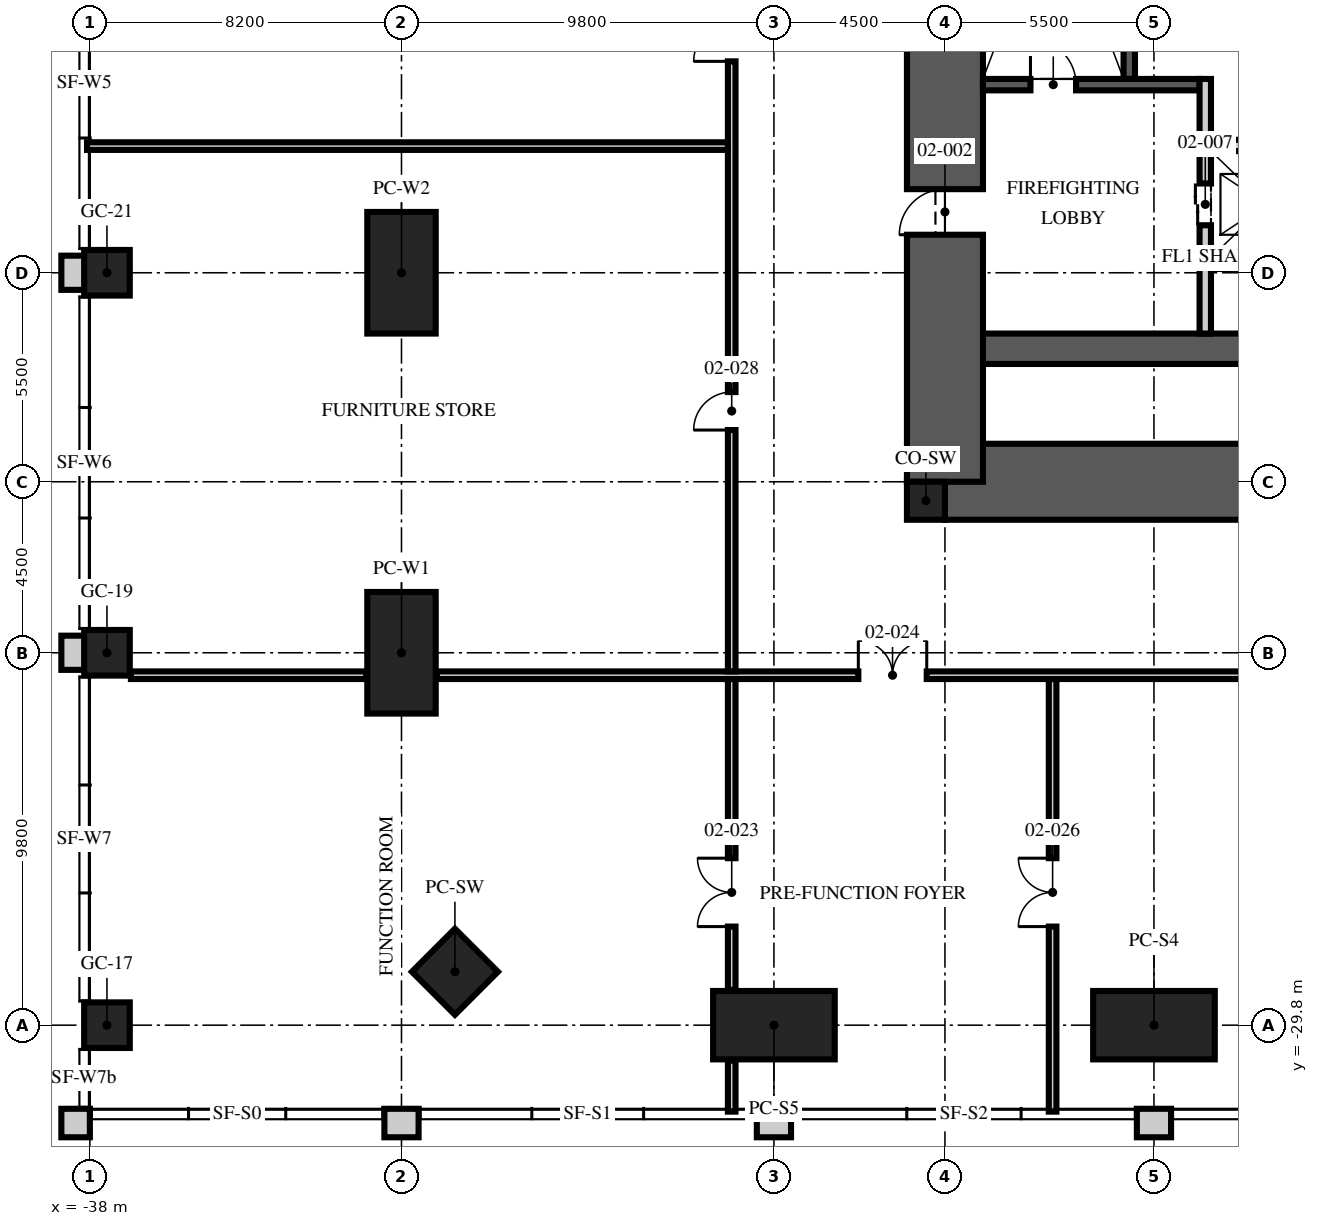
"""IFC4 building model, lengths in metres.
Left out: names, types, materials, properties, quantities, classifications, styles, units other than length and angle.
Written with IfcOpenShell. Run it as: python <this file> out.ifc"""

import sys

from ifc_helpers import new_model, si_unit, direction, frame, frame_2d, origin, origin_2d, place, context, subcontext, project, spatial, rectangle, hollow_rectangle, extrude, element, fill, save


model = new_model("IFC4")
c1 = context("Model", 3, precision=1e-05, world=origin(), true_north=direction((0.0, 1.0)))
c2 = subcontext(c1, "Body", "Model", "MODEL_VIEW")
j1 = project(units=[si_unit("LENGTHUNIT", "METRE"), si_unit("PLANEANGLEUNIT", "RADIAN")], contexts=[c1])
p1 = place(None, origin())
s1 = spatial("IfcSite", under=j1, at=p1, CompositionType="ELEMENT")
p2 = place(p1, origin())
s2 = spatial("IfcBuilding", under=s1, at=p2, CompositionType="ELEMENT")
p3 = place(p2, frame((0.0, 0.0, 11.0)))
s3 = spatial("IfcBuildingStorey", under=s2, at=p3, CompositionType="ELEMENT", Elevation=11.0)
p4 = place(p3, frame((-15.5, -15.5, -0.3), z_axis=(0.0, 0.0, 1.0), x_axis=(1.0, 0.0, 0.0)))
e1 = element("IfcWall", 1, at=p4, inside=s3, PredefinedType="SHEAR", context=c2, shape_type="SweptSolid", body=[
    extrude(rectangle(XDim=31.0, YDim=2.0, at=frame_2d((15.5, 0.0))), origin(), (0.0, 0.0, 1.0), 5.0),
])
p5 = place(p3, frame((-15.5, -12.0, -0.3), z_axis=(0.0, 0.0, 1.0), x_axis=(1.0, 0.0, 0.0)))
e2 = element("IfcWall", 2, at=p5, inside=s3, PredefinedType="SHEAR", context=c2, shape_type="SweptSolid", body=[
    extrude(rectangle(XDim=31.0, YDim=0.8, at=frame_2d((15.5, 0.0))), origin(), (0.0, 0.0, 1.0), 5.0),
])
p6 = place(p3, frame((-15.5, -15.5, -0.3), z_axis=(0.0, 0.0, 1.0), x_axis=(0.0, 1.0, 0.0)))
e3 = element("IfcWall", 3, at=p6, inside=s3, PredefinedType="SHEAR", context=c2, shape_type="SweptSolid", body=[
    extrude(rectangle(XDim=31.0, YDim=2.0, at=frame_2d((15.5, 0.0))), origin(), (0.0, 0.0, 1.0), 5.0),
])
p7 = place(p6, frame((6.5, 0.0, 0.3)))
e4 = element("IfcOpeningElement", 4, at=p7, cuts=e3, PredefinedType="OPENING", context=c2, shape_type="SweptSolid", body=[
    extrude(rectangle(XDim=1.2, YDim=2.1, at=frame_2d((0.6, 1.05))), frame((0.0, 1.01, 0.0), z_axis=(0.0, -1.0, 0.0), x_axis=(1.0, 0.0, 0.0)), (0.0, 0.0, 1.0), 2.02),
])
p8 = place(p6, frame((23.0, 0.0, 0.3)))
e5 = element("IfcOpeningElement", 5, at=p8, cuts=e3, PredefinedType="OPENING", context=c2, shape_type="SweptSolid", body=[
    extrude(rectangle(XDim=1.8, YDim=2.1, at=frame_2d((0.9, 1.05))), frame((0.0, 1.01, 0.0), z_axis=(0.0, -1.0, 0.0), x_axis=(1.0, 0.0, 0.0)), (0.0, 0.0, 1.0), 2.02),
])
p9 = place(p3, frame((-16.0, -16.0, -0.3), z_axis=(0.0, 0.0, 1.0), x_axis=(1.0, 0.0, 0.0)))
e6 = element("IfcColumn", 6, at=p9, inside=s3, PredefinedType="COLUMN", context=c2, shape_type="SweptSolid", body=[
    extrude(rectangle(XDim=1.0, YDim=1.0, at=origin_2d()), origin(), (0.0, 0.0, 1.0), 5.0),
])
for number, where, z_axis, x_axis in (
    (7, (-10.0, -29.8, 0.0), (0.0, 0.0, 1.0), (1.0, 0.0, 0.0)),
    (8, (-20.0, -29.8, 0.0), (0.0, 0.0, 1.0), (1.0, 0.0, 0.0)),
    (9, (-29.8, -20.0, 0.0), (0.0, 0.0, 1.0), (0.0, 1.0, 0.0)),
    (10, (-29.8, -10.0, 0.0), (0.0, 0.0, 1.0), (0.0, 1.0, 0.0)),
):
    element("IfcColumn", number, at=place(p3, frame(where, z_axis=z_axis, x_axis=x_axis)), inside=s3, PredefinedType="COLUMN", context=c2, shape_type="SweptSolid", body=[
        extrude(hollow_rectangle(XDim=3.2, YDim=1.8, WallThickness=0.2, at=origin_2d()), origin(), (0.0, 0.0, 1.0), 5.0),
    ])
p10 = place(p3, frame((-28.394, -28.394, 0.0), z_axis=(0.0, 0.0, 1.0), x_axis=(0.707106781187, -0.707106781187, 0.0)))
e11 = element("IfcColumn", 11, at=p10, inside=s3, PredefinedType="COLUMN", context=c2, shape_type="SweptSolid", body=[
    extrude(hollow_rectangle(XDim=1.6, YDim=1.6, WallThickness=0.1, at=origin_2d()), origin(), (0.0, 0.0, 1.0), 5.0),
])
for number, where, z_axis, x_axis in (
    (12, (-37.55, -29.8, 0.0), (0.0, 0.0, 1.0), (1.0, 0.0, 0.0)),
    (13, (-37.55, -20.0, 0.0), (0.0, 0.0, 1.0), (1.0, 0.0, 0.0)),
    (14, (-37.55, -10.0, 0.0), (0.0, 0.0, 1.0), (1.0, 0.0, 0.0)),
):
    element("IfcColumn", number, at=place(p3, frame(where, z_axis=z_axis, x_axis=x_axis)), inside=s3, PredefinedType="COLUMN", context=c2, shape_type="SweptSolid", body=[
        extrude(rectangle(XDim=1.2, YDim=1.2, at=origin_2d()), origin(), (0.0, 0.0, 1.0), 5.0),
    ])
for number, where, z_axis, x_axis in (
    (15, (-30.25, -32.375, 0.0), (0.0, 0.0, 1.0), (1.0, 0.0, 0.0)),
    (16, (-20.45, -32.375, 0.0), (0.0, 0.0, 1.0), (1.0, 0.0, 0.0)),
    (17, (-10.45, -32.375, 0.0), (0.0, 0.0, 1.0), (1.0, 0.0, 0.0)),
    (18, (-38.375, -9.55, 0.0), (0.0, 0.0, 1.0), (0.0, -1.0, 0.0)),
    (19, (-38.375, -19.55, 0.0), (0.0, 0.0, 1.0), (0.0, -1.0, 0.0)),
):
    element("IfcWall", number, at=place(p3, frame(where, z_axis=z_axis, x_axis=x_axis)), inside=s3, PredefinedType="SOLIDWALL", context=c2, shape_type="SweptSolid", body=[
        extrude(rectangle(XDim=0.9, YDim=0.75, at=frame_2d((0.45, 0.0))), origin(), (0.0, 0.0, 1.0), 5.0),
    ])
p11 = place(p3, frame((-38.375, -32.0, 0.0), z_axis=(0.0, 0.0, 1.0), x_axis=(0.0, -1.0, 0.0)))
e20 = element("IfcWall", 20, at=p11, inside=s3, PredefinedType="SOLIDWALL", context=c2, shape_type="SweptSolid", body=[
    extrude(rectangle(XDim=0.75, YDim=0.75, at=frame_2d((0.375, 0.0))), origin(), (0.0, 0.0, 1.0), 5.0),
])
p12 = place(p3, frame((-10.65, -4.9, 0.0), z_axis=(0.0, 0.0, 1.0), x_axis=(0.0, 1.0, 0.0)))
e21 = element("IfcWall", 21, at=p12, inside=s3, PredefinedType="SOLIDWALL", context=c2, shape_type="SweptSolid", body=[
    extrude(rectangle(XDim=10.1, YDim=0.3, at=frame_2d((5.05, 0.0))), origin(), (0.0, 0.0, 1.0), 4.7),
])
p13 = place(p3, frame((-14.5, -5.05, 0.0), z_axis=(0.0, 0.0, 1.0), x_axis=(1.0, 0.0, 0.0)))
e22 = element("IfcWall", 22, at=p13, inside=s3, PredefinedType="SOLIDWALL", context=c2, shape_type="SweptSolid", body=[
    extrude(rectangle(XDim=5.7, YDim=0.3, at=frame_2d((2.85, 0.0))), origin(), (0.0, 0.0, 1.0), 4.7),
])
p14 = place(p13, frame((1.25, 0.0, 0.0)))
e23 = element("IfcOpeningElement", 23, at=p14, cuts=e22, PredefinedType="OPENING", context=c2, shape_type="SweptSolid", body=[
    extrude(rectangle(XDim=1.2, YDim=2.1, at=frame_2d((0.6, 1.05))), frame((0.0, 0.16, 0.0), z_axis=(0.0, -1.0, 0.0), x_axis=(1.0, 0.0, 0.0)), (0.0, 0.0, 1.0), 0.32),
])
p15 = place(p3, frame((-8.65, -11.6, 0.0), z_axis=(0.0, 0.0, 1.0), x_axis=(0.0, 1.0, 0.0)))
e24 = element("IfcWall", 24, at=p15, inside=s3, PredefinedType="PARTITIONING", context=c2, shape_type="SweptSolid", body=[
    extrude(rectangle(XDim=6.7, YDim=0.3, at=frame_2d((3.35, 0.0))), origin(), (0.0, 0.0, 1.0), 4.7),
])
p16 = place(p15, frame((2.85, 0.0, 0.0)))
e25 = element("IfcOpeningElement", 25, at=p16, cuts=e24, PredefinedType="OPENING", context=c2, shape_type="SweptSolid", body=[
    extrude(rectangle(XDim=1.1, YDim=2.1, at=frame_2d((0.55, 1.05))), frame((0.0, 0.16, 0.0), z_axis=(0.0, -1.0, 0.0), x_axis=(1.0, 0.0, 0.0)), (0.0, 0.0, 1.0), 0.32),
])
p17 = place(p3, frame((-8.5, -6.65, 0.0), z_axis=(0.0, 0.0, 1.0), x_axis=(1.0, 0.0, 0.0)))
e26 = element("IfcWall", 26, at=p17, inside=s3, PredefinedType="PARTITIONING", context=c2, shape_type="SweptSolid", body=[
    extrude(rectangle(XDim=17.0, YDim=0.3, at=frame_2d((8.5, 0.0))), origin(), (0.0, 0.0, 1.0), 4.7),
])
p18 = place(p17, frame((7.8, 0.0, 0.0)))
e27 = element("IfcOpeningElement", 27, at=p18, cuts=e26, PredefinedType="OPENING", context=c2, shape_type="SweptSolid", body=[
    extrude(rectangle(XDim=1.3, YDim=2.4, at=frame_2d((0.65, 1.2))), frame((0.0, 0.16, 0.0), z_axis=(0.0, -1.0, 0.0), x_axis=(1.0, 0.0, 0.0)), (0.0, 0.0, 1.0), 0.32),
])
p19 = place(p17, frame((5.65, 0.0, 0.0)))
e28 = element("IfcOpeningElement", 28, at=p19, cuts=e26, PredefinedType="OPENING", context=c2, shape_type="SweptSolid", body=[
    extrude(rectangle(XDim=0.9, YDim=2.1, at=frame_2d((0.45, 1.05))), frame((0.0, 0.16, 0.0), z_axis=(0.0, -1.0, 0.0), x_axis=(1.0, 0.0, 0.0)), (0.0, 0.0, 1.0), 0.32),
])
p20 = place(p17, frame((10.4, 0.0, 0.0)))
e29 = element("IfcOpeningElement", 29, at=p20, cuts=e26, PredefinedType="OPENING", context=c2, shape_type="SweptSolid", body=[
    extrude(rectangle(XDim=0.9, YDim=2.1, at=frame_2d((0.45, 1.05))), frame((0.0, 0.16, 0.0), z_axis=(0.0, -1.0, 0.0), x_axis=(1.0, 0.0, 0.0)), (0.0, 0.0, 1.0), 0.32),
])
p21 = place(p3, frame((-8.5, -9.75, 0.0), z_axis=(0.0, 0.0, 1.0), x_axis=(1.0, 0.0, 0.0)))
e30 = element("IfcWall", 30, at=p21, inside=s3, PredefinedType="PARTITIONING", context=c2, shape_type="SweptSolid", body=[
    extrude(rectangle(XDim=2.9, YDim=0.3, at=frame_2d((1.45, 0.0))), origin(), (0.0, 0.0, 1.0), 4.7),
])
p22 = place(p3, frame((-21.111, -32.075, 0.0), z_axis=(0.0, 0.0, 1.0), x_axis=(0.0, 1.0, 0.0)))
e31 = element("IfcWall", 31, at=p22, inside=s3, PredefinedType="SOLIDWALL", context=c2, shape_type="SweptSolid", body=[
    extrude(rectangle(XDim=1.345, YDim=0.2, at=frame_2d((0.672, 0.0))), origin(), (0.0, 0.0, 1.0), 4.7),
])
p23 = place(p3, frame((-12.667, -32.075, 0.0), z_axis=(0.0, 0.0, 1.0), x_axis=(0.0, 1.0, 0.0)))
e32 = element("IfcWall", 32, at=p23, inside=s3, PredefinedType="SOLIDWALL", context=c2, shape_type="SweptSolid", body=[
    extrude(rectangle(XDim=11.384, YDim=0.2, at=frame_2d((5.692, 0.0))), origin(), (0.0, 0.0, 1.0), 3.7),
])
p24 = place(p23, frame((4.869, 0.0, 0.0)))
e33 = element("IfcOpeningElement", 33, at=p24, cuts=e32, PredefinedType="OPENING", context=c2, shape_type="SweptSolid", body=[
    extrude(rectangle(XDim=1.8, YDim=2.4, at=frame_2d((0.9, 1.2))), frame((0.0, 0.11, 0.0), z_axis=(0.0, -1.0, 0.0), x_axis=(1.0, 0.0, 0.0)), (0.0, 0.0, 1.0), 0.22),
])
p25 = place(p3, frame((-21.111, -28.87, 0.0), z_axis=(0.0, 0.0, 1.0), x_axis=(0.0, 1.0, 0.0)))
e34 = element("IfcWall", 34, at=p25, inside=s3, PredefinedType="SOLIDWALL", context=c2, shape_type="SweptSolid", body=[
    extrude(rectangle(XDim=8.179, YDim=0.2, at=frame_2d((4.089, 0.0))), origin(), (0.0, 0.0, 1.0), 3.5),
])
p26 = place(p25, frame((1.664, 0.0, 0.0)))
e35 = element("IfcOpeningElement", 35, at=p26, cuts=e34, PredefinedType="OPENING", context=c2, shape_type="SweptSolid", body=[
    extrude(rectangle(XDim=1.8, YDim=2.4, at=frame_2d((0.9, 1.2))), frame((0.0, 0.11, 0.0), z_axis=(0.0, -1.0, 0.0), x_axis=(1.0, 0.0, 0.0)), (0.0, 0.0, 1.0), 0.22),
])
p27 = place(p3, frame((-36.92, -20.591, 0.0), z_axis=(0.0, 0.0, 1.0), x_axis=(1.0, 0.0, 0.0)))
e36 = element("IfcWall", 36, at=p27, inside=s3, PredefinedType="SOLIDWALL", context=c2, shape_type="SweptSolid", body=[
    extrude(rectangle(XDim=6.19, YDim=0.2, at=frame_2d((3.095, 0.0))), origin(), (0.0, 0.0, 1.0), 3.7),
])
p28 = place(p3, frame((-28.87, -20.591, 0.0), z_axis=(0.0, 0.0, 1.0), x_axis=(1.0, 0.0, 0.0)))
e37 = element("IfcWall", 37, at=p28, inside=s3, PredefinedType="SOLIDWALL", context=c2, shape_type="SweptSolid", body=[
    extrude(rectangle(XDim=57.74, YDim=0.2, at=frame_2d((28.87, 0.0))), origin(), (0.0, 0.0, 1.0), 3.5),
])
p29 = place(p28, frame((11.091, 0.0, 0.0)))
e38 = element("IfcOpeningElement", 38, at=p29, cuts=e37, PredefinedType="OPENING", context=c2, shape_type="SweptSolid", body=[
    extrude(rectangle(XDim=1.8, YDim=2.4, at=frame_2d((0.9, 1.2))), frame((0.0, 0.11, 0.0), z_axis=(0.0, -1.0, 0.0), x_axis=(1.0, 0.0, 0.0)), (0.0, 0.0, 1.0), 0.22),
])
p30 = place(p28, frame((32.202, 0.0, 0.0)))
e39 = element("IfcOpeningElement", 39, at=p30, cuts=e37, PredefinedType="OPENING", context=c2, shape_type="SweptSolid", body=[
    extrude(rectangle(XDim=1.8, YDim=2.4, at=frame_2d((0.9, 1.2))), frame((0.0, 0.11, 0.0), z_axis=(0.0, -1.0, 0.0), x_axis=(1.0, 0.0, 0.0)), (0.0, 0.0, 1.0), 0.22),
])
p31 = place(p3, frame((-21.111, -20.491, 0.0), z_axis=(0.0, 0.0, 1.0), x_axis=(0.0, 1.0, 0.0)))
e40 = element("IfcWall", 40, at=p31, inside=s3, PredefinedType="SOLIDWALL", context=c2, shape_type="SweptSolid", body=[
    extrude(rectangle(XDim=42.022, YDim=0.2, at=frame_2d((21.011, 0.0))), origin(), (0.0, 0.0, 1.0), 3.5),
])
p32 = place(p31, frame((6.352, 0.0, 0.0)))
e41 = element("IfcOpeningElement", 41, at=p32, cuts=e40, PredefinedType="OPENING", context=c2, shape_type="SweptSolid", body=[
    extrude(rectangle(XDim=1.0, YDim=2.1, at=frame_2d((0.5, 1.05))), frame((0.0, 0.11, 0.0), z_axis=(0.0, -1.0, 0.0), x_axis=(1.0, 0.0, 0.0)), (0.0, 0.0, 1.0), 0.22),
])
p33 = place(p31, frame((16.054, 0.0, 0.0)))
e42 = element("IfcOpeningElement", 42, at=p33, cuts=e40, PredefinedType="OPENING", context=c2, shape_type="SweptSolid", body=[
    extrude(rectangle(XDim=1.0, YDim=2.1, at=frame_2d((0.5, 1.05))), frame((0.0, 0.11, 0.0), z_axis=(0.0, -1.0, 0.0), x_axis=(1.0, 0.0, 0.0)), (0.0, 0.0, 1.0), 0.22),
])
p34 = place(p31, frame((23.016, 0.0, 0.0)))
e43 = element("IfcOpeningElement", 43, at=p34, cuts=e40, PredefinedType="OPENING", context=c2, shape_type="SweptSolid", body=[
    extrude(rectangle(XDim=1.0, YDim=2.1, at=frame_2d((0.5, 1.05))), frame((0.0, 0.11, 0.0), z_axis=(0.0, -1.0, 0.0), x_axis=(1.0, 0.0, 0.0)), (0.0, 0.0, 1.0), 0.22),
])
p35 = place(p31, frame((31.46, 0.0, 0.0)))
e44 = element("IfcOpeningElement", 44, at=p35, cuts=e40, PredefinedType="OPENING", context=c2, shape_type="SweptSolid", body=[
    extrude(rectangle(XDim=1.0, YDim=2.1, at=frame_2d((0.5, 1.05))), frame((0.0, 0.11, 0.0), z_axis=(0.0, -1.0, 0.0), x_axis=(1.0, 0.0, 0.0)), (0.0, 0.0, 1.0), 0.22),
])
p36 = place(p31, frame((38.647, 0.0, 0.0)))
e45 = element("IfcOpeningElement", 45, at=p36, cuts=e40, PredefinedType="OPENING", context=c2, shape_type="SweptSolid", body=[
    extrude(rectangle(XDim=1.0, YDim=2.1, at=frame_2d((0.5, 1.05))), frame((0.0, 0.11, 0.0), z_axis=(0.0, -1.0, 0.0), x_axis=(1.0, 0.0, 0.0)), (0.0, 0.0, 1.0), 0.22),
])
p37 = place(p3, frame((-38.075, -6.667, 0.0), z_axis=(0.0, 0.0, 1.0), x_axis=(1.0, 0.0, 0.0)))
e46 = element("IfcWall", 46, at=p37, inside=s3, PredefinedType="SOLIDWALL", context=c2, shape_type="SweptSolid", body=[
    extrude(rectangle(XDim=16.864, YDim=0.2, at=frame_2d((8.432, 0.0))), origin(), (0.0, 0.0, 1.0), 3.7),
])
p38 = place(p14, origin())
e47 = element("IfcDoor", 47, at=p38, inside=s3, OperationType="SINGLE_SWING_LEFT", PredefinedType="DOOR", context=c2, shape_type="SweptSolid", body=[
    extrude(rectangle(XDim=1.2, YDim=2.1, at=frame_2d((0.6, 1.05))), frame((0.0, 0.025, 0.0), z_axis=(0.0, -1.0, 0.0), x_axis=(1.0, 0.0, 0.0)), (0.0, 0.0, 1.0), 0.05),
])
fill(e23, e47)
p39 = place(p7, origin())
e48 = element("IfcDoor", 48, at=p39, inside=s3, OperationType="SINGLE_SWING_LEFT", PredefinedType="DOOR", context=c2, shape_type="SweptSolid", body=[
    extrude(rectangle(XDim=1.2, YDim=2.1, at=frame_2d((0.6, 1.05))), frame((0.0, 0.025, 0.0), z_axis=(0.0, -1.0, 0.0), x_axis=(1.0, 0.0, 0.0)), (0.0, 0.0, 1.0), 0.05),
])
fill(e4, e48)
p40 = place(p16, origin())
e49 = element("IfcDoor", 49, at=p40, inside=s3, OperationType="DOUBLE_DOOR_SLIDING", PredefinedType="DOOR", context=c2, shape_type="SweptSolid", body=[
    extrude(rectangle(XDim=1.1, YDim=2.1, at=frame_2d((0.55, 1.05))), frame((0.0, 0.025, 0.0), z_axis=(0.0, -1.0, 0.0), x_axis=(1.0, 0.0, 0.0)), (0.0, 0.0, 1.0), 0.05),
])
fill(e25, e49)
p41 = place(p26, origin())
e50 = element("IfcDoor", 50, at=p41, inside=s3, OperationType="DOUBLE_DOOR_SINGLE_SWING", PredefinedType="DOOR", context=c2, shape_type="SweptSolid", body=[
    extrude(rectangle(XDim=1.8, YDim=2.4, at=frame_2d((0.9, 1.2))), frame((0.0, 0.025, 0.0), z_axis=(0.0, -1.0, 0.0), x_axis=(1.0, 0.0, 0.0)), (0.0, 0.0, 1.0), 0.05),
])
fill(e35, e50)
p42 = place(p29, origin())
e51 = element("IfcDoor", 51, at=p42, inside=s3, OperationType="DOUBLE_DOOR_SINGLE_SWING", PredefinedType="DOOR", context=c2, shape_type="SweptSolid", body=[
    extrude(rectangle(XDim=1.8, YDim=2.4, at=frame_2d((0.9, 1.2))), frame((0.0, 0.025, 0.0), z_axis=(0.0, -1.0, 0.0), x_axis=(1.0, 0.0, 0.0)), (0.0, 0.0, 1.0), 0.05),
])
fill(e38, e51)
p43 = place(p24, origin())
e52 = element("IfcDoor", 52, at=p43, inside=s3, OperationType="DOUBLE_DOOR_SINGLE_SWING", PredefinedType="DOOR", context=c2, shape_type="SweptSolid", body=[
    extrude(rectangle(XDim=1.8, YDim=2.4, at=frame_2d((0.9, 1.2))), frame((0.0, 0.025, 0.0), z_axis=(0.0, -1.0, 0.0), x_axis=(1.0, 0.0, 0.0)), (0.0, 0.0, 1.0), 0.05),
])
fill(e33, e52)
p44 = place(p32, origin())
e53 = element("IfcDoor", 53, at=p44, inside=s3, OperationType="SINGLE_SWING_LEFT", PredefinedType="DOOR", context=c2, shape_type="SweptSolid", body=[
    extrude(rectangle(XDim=1.0, YDim=2.1, at=frame_2d((0.5, 1.05))), frame((0.0, 0.025, 0.0), z_axis=(0.0, -1.0, 0.0), x_axis=(1.0, 0.0, 0.0)), (0.0, 0.0, 1.0), 0.05),
])
fill(e41, e53)
p45 = place(p33, origin())
e54 = element("IfcDoor", 54, at=p45, inside=s3, OperationType="SINGLE_SWING_LEFT", PredefinedType="DOOR", context=c2, shape_type="SweptSolid", body=[
    extrude(rectangle(XDim=1.0, YDim=2.1, at=frame_2d((0.5, 1.05))), frame((0.0, 0.025, 0.0), z_axis=(0.0, -1.0, 0.0), x_axis=(1.0, 0.0, 0.0)), (0.0, 0.0, 1.0), 0.05),
])
fill(e42, e54)
save(model, sys.argv[1])
